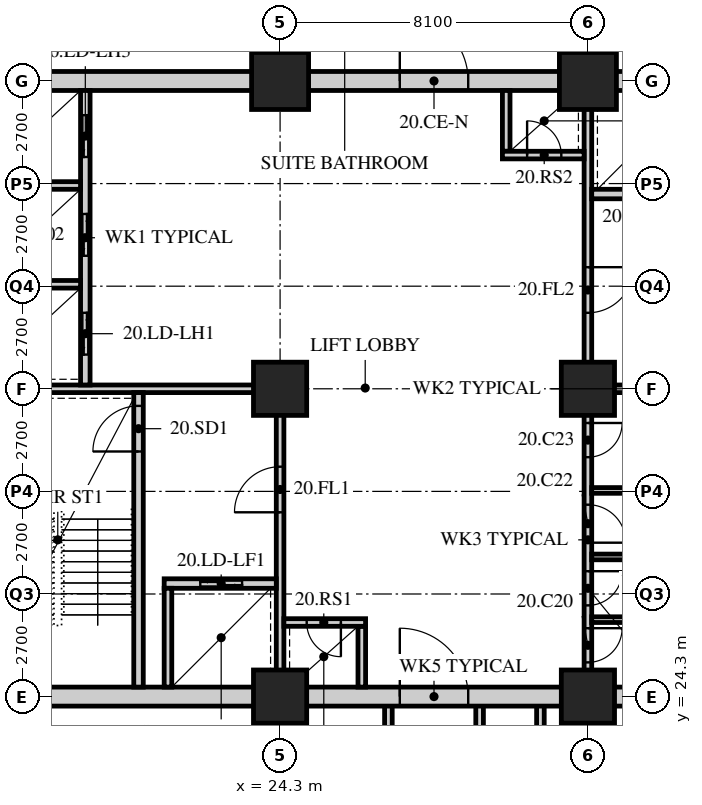
"""IFC4 building model, lengths in metres.
Left out: names, types, materials, properties, quantities, classifications, styles, units other than length and angle.
Written with IfcOpenShell. Run it as: python <this file> out.ifc"""

import sys

from ifc_helpers import new_model, si_unit, direction, frame, frame_2d, origin, origin_2d, place, context, subcontext, project, spatial, rectangle, hollow_rectangle, extrude, element, fill, save


model = new_model("IFC4")
c1 = context("Model", 3, precision=1e-05, world=origin(), true_north=direction((0.0, 1.0)))
c2 = subcontext(c1, "Body", "Model", "MODEL_VIEW")
j1 = project(units=[si_unit("LENGTHUNIT", "METRE"), si_unit("PLANEANGLEUNIT", "RADIAN")], contexts=[c1])
p1 = place(None, origin())
s1 = spatial("IfcSite", under=j1, at=p1, CompositionType="ELEMENT")
p2 = place(p1, origin())
s2 = spatial("IfcBuilding", under=s1, at=p2, CompositionType="ELEMENT")
p3 = place(p2, frame((0.0, 0.0, 80.6)))
s3 = spatial("IfcBuildingStorey", under=s2, at=p3, CompositionType="ELEMENT", Elevation=80.6)
for number, where, z_axis, x_axis in (
    (1, (24.3, 24.3, 0.0), (0.0, 0.0, 1.0), (1.0, 0.0, 0.0)),
    (2, (24.3, 32.4, 0.0), (0.0, 0.0, 1.0), (1.0, 0.0, 0.0)),
):
    element("IfcColumn", number, at=place(p3, frame(where, z_axis=z_axis, x_axis=x_axis)), inside=s3, PredefinedType="COLUMN", context=c2, shape_type="SweptSolid", body=[
        extrude(hollow_rectangle(XDim=1.4, YDim=1.4, WallThickness=0.12, at=origin_2d()), origin(), (0.0, 0.0, 1.0), 3.4),
    ])
p4 = place(p3, frame((24.3, 40.5, 0.0), z_axis=(0.0, 0.0, 1.0), x_axis=(1.0, 0.0, 0.0)))
e3 = element("IfcColumn", 3, at=p4, inside=s3, PredefinedType="COLUMN", context=c2, shape_type="SweptSolid", body=[
    extrude(hollow_rectangle(XDim=1.5, YDim=1.5, WallThickness=0.13, at=origin_2d()), origin(), (0.0, 0.0, 1.0), 3.4),
])
for number, where, z_axis, x_axis in (
    (4, (32.4, 24.3, 0.0), (0.0, 0.0, 1.0), (1.0, 0.0, 0.0)),
    (5, (32.4, 32.4, 0.0), (0.0, 0.0, 1.0), (1.0, 0.0, 0.0)),
):
    element("IfcColumn", number, at=place(p3, frame(where, z_axis=z_axis, x_axis=x_axis)), inside=s3, PredefinedType="COLUMN", context=c2, shape_type="SweptSolid", body=[
        extrude(hollow_rectangle(XDim=1.4, YDim=1.4, WallThickness=0.12, at=origin_2d()), origin(), (0.0, 0.0, 1.0), 3.4),
    ])
p5 = place(p3, frame((32.4, 40.5, 0.0), z_axis=(0.0, 0.0, 1.0), x_axis=(1.0, 0.0, 0.0)))
e6 = element("IfcColumn", 6, at=p5, inside=s3, PredefinedType="COLUMN", context=c2, shape_type="SweptSolid", body=[
    extrude(hollow_rectangle(XDim=1.5, YDim=1.5, WallThickness=0.13, at=origin_2d()), origin(), (0.0, 0.0, 1.0), 3.4),
])
for number, where, z_axis, x_axis in (
    (7, (31.15, 18.0, 0.0), (0.0, 0.0, 1.0), (0.0, 1.0, 0.0)),
    (8, (27.15, 18.0, 0.0), (0.0, 0.0, 1.0), (0.0, 1.0, 0.0)),
    (9, (29.55, 18.0, 0.0), (0.0, 0.0, 1.0), (0.0, 1.0, 0.0)),
):
    element("IfcWall", number, at=place(p3, frame(where, z_axis=z_axis, x_axis=x_axis)), inside=s3, PredefinedType="SOLIDWALL", context=c2, shape_type="SweptSolid", body=[
        extrude(rectangle(XDim=6.3, YDim=0.2, at=frame_2d((3.15, 0.0))), origin(), (0.0, 0.0, 1.0), 3.19),
    ])
p6 = place(p3, frame((15.95, 24.3, 0.0), z_axis=(0.0, 0.0, 1.0), x_axis=(1.0, 0.0, 0.0)))
e10 = element("IfcWall", 10, at=p6, inside=s3, PredefinedType="SOLIDWALL", context=c2, shape_type="SweptSolid", body=[
    extrude(rectangle(XDim=24.8, YDim=0.5, at=frame_2d((12.4, 0.0))), origin(), (0.0, 0.0, 1.0), 2.428),
])
p7 = place(p6, frame((11.5, 0.0, 0.0)))
e11 = element("IfcOpeningElement", 11, at=p7, cuts=e10, PredefinedType="OPENING", context=c2, shape_type="SweptSolid", body=[
    extrude(rectangle(XDim=1.8, YDim=2.4, at=frame_2d((0.9, 1.2))), frame((0.0, 0.26, 0.0), z_axis=(0.0, -1.0, 0.0), x_axis=(1.0, 0.0, 0.0)), (0.0, 0.0, 1.0), 0.52),
])
p8 = place(p3, frame((15.95, 40.5, 0.0), z_axis=(0.0, 0.0, 1.0), x_axis=(1.0, 0.0, 0.0)))
e12 = element("IfcWall", 12, at=p8, inside=s3, PredefinedType="SOLIDWALL", context=c2, shape_type="SweptSolid", body=[
    extrude(rectangle(XDim=24.8, YDim=0.5, at=frame_2d((12.4, 0.0))), origin(), (0.0, 0.0, 1.0), 2.428),
])
p9 = place(p8, frame((11.5, 0.0, 0.0)))
e13 = element("IfcOpeningElement", 13, at=p9, cuts=e12, PredefinedType="OPENING", context=c2, shape_type="SweptSolid", body=[
    extrude(rectangle(XDim=1.8, YDim=2.4, at=frame_2d((0.9, 1.2))), frame((0.0, 0.26, 0.0), z_axis=(0.0, -1.0, 0.0), x_axis=(1.0, 0.0, 0.0)), (0.0, 0.0, 1.0), 0.52),
])
p10 = place(p3, frame((16.45, 32.4, 0.0), z_axis=(0.0, 0.0, 1.0), x_axis=(1.0, 0.0, 0.0)))
e14 = element("IfcWall", 14, at=p10, inside=s3, PredefinedType="SOLIDWALL", context=c2, shape_type="SweptSolid", body=[
    extrude(rectangle(XDim=7.95, YDim=0.2, at=frame_2d((3.975, 0.0))), origin(), (0.0, 0.0, 1.0), 2.578),
])
p11 = place(p3, frame((24.3, 24.55, 0.0), z_axis=(0.0, 0.0, 1.0), x_axis=(0.0, 1.0, 0.0)))
e15 = element("IfcWall", 15, at=p11, inside=s3, PredefinedType="SOLIDWALL", context=c2, shape_type="SweptSolid", body=[
    extrude(rectangle(XDim=7.75, YDim=0.2, at=frame_2d((3.875, 0.0))), origin(), (0.0, 0.0, 1.0), 2.578),
])
p12 = place(p11, frame((4.6, 0.0, 0.0)))
e16 = element("IfcOpeningElement", 16, at=p12, cuts=e15, PredefinedType="OPENING", context=c2, shape_type="SweptSolid", body=[
    extrude(rectangle(XDim=1.2, YDim=2.1, at=frame_2d((0.6, 1.05))), frame((0.0, 0.11, 0.0), z_axis=(0.0, -1.0, 0.0), x_axis=(1.0, 0.0, 0.0)), (0.0, 0.0, 1.0), 0.22),
])
p13 = place(p3, frame((20.575, 24.55, 0.0), z_axis=(0.0, 0.0, 1.0), x_axis=(0.0, 1.0, 0.0)))
e17 = element("IfcWall", 17, at=p13, inside=s3, PredefinedType="SOLIDWALL", context=c2, shape_type="SweptSolid", body=[
    extrude(rectangle(XDim=7.75, YDim=0.25, at=frame_2d((3.875, 0.0))), origin(), (0.0, 0.0, 1.0), 3.19),
])
p14 = place(p13, frame((6.2, 0.0, 0.0)))
e18 = element("IfcOpeningElement", 18, at=p14, cuts=e17, PredefinedType="OPENING", context=c2, shape_type="SweptSolid", body=[
    extrude(rectangle(XDim=1.2, YDim=2.1, at=frame_2d((0.6, 1.05))), frame((0.0, 0.135, 0.0), z_axis=(0.0, -1.0, 0.0), x_axis=(1.0, 0.0, 0.0)), (0.0, 0.0, 1.0), 0.27),
])
p15 = place(p3, frame((21.25, 27.275, 0.0), z_axis=(0.0, 0.0, 1.0), x_axis=(1.0, 0.0, 0.0)))
e19 = element("IfcWall", 19, at=p15, inside=s3, PredefinedType="SOLIDWALL", context=c2, shape_type="SweptSolid", body=[
    extrude(rectangle(XDim=2.95, YDim=0.25, at=frame_2d((1.475, 0.0))), origin(), (0.0, 0.0, 1.0), 3.19),
])
p16 = place(p15, frame((0.95, 0.0, 0.0)))
e20 = element("IfcOpeningElement", 20, at=p16, cuts=e19, PredefinedType="OPENING", context=c2, shape_type="SweptSolid", body=[
    extrude(rectangle(XDim=1.1, YDim=2.4, at=frame_2d((0.55, 1.2))), frame((0.0, 0.135, 0.0), z_axis=(0.0, -1.0, 0.0), x_axis=(1.0, 0.0, 0.0)), (0.0, 0.0, 1.0), 0.27),
])
p17 = place(p3, frame((21.35, 24.55, 0.0), z_axis=(0.0, 0.0, 1.0), x_axis=(0.0, 1.0, 0.0)))
e21 = element("IfcWall", 21, at=p17, inside=s3, PredefinedType="SOLIDWALL", context=c2, shape_type="SweptSolid", body=[
    extrude(rectangle(XDim=2.6, YDim=0.2, at=frame_2d((1.3, 0.0))), origin(), (0.0, 0.0, 1.0), 3.19),
])
p18 = place(p3, frame((19.175, 32.5, 0.0), z_axis=(0.0, 0.0, 1.0), x_axis=(0.0, 1.0, 0.0)))
e22 = element("IfcWall", 22, at=p18, inside=s3, PredefinedType="SOLIDWALL", context=c2, shape_type="SweptSolid", body=[
    extrude(rectangle(XDim=7.75, YDim=0.25, at=frame_2d((3.875, 0.0))), origin(), (0.0, 0.0, 1.0), 3.19),
])
p19 = place(p18, frame((0.8, 0.0, 0.0)))
e23 = element("IfcOpeningElement", 23, at=p19, cuts=e22, PredefinedType="OPENING", context=c2, shape_type="SweptSolid", body=[
    extrude(rectangle(XDim=1.1, YDim=2.4, at=frame_2d((0.55, 1.2))), frame((0.0, 0.135, 0.0), z_axis=(0.0, -1.0, 0.0), x_axis=(1.0, 0.0, 0.0)), (0.0, 0.0, 1.0), 0.27),
])
p20 = place(p18, frame((3.4, 0.0, 0.0)))
e24 = element("IfcOpeningElement", 24, at=p20, cuts=e22, PredefinedType="OPENING", context=c2, shape_type="SweptSolid", body=[
    extrude(rectangle(XDim=1.1, YDim=2.4, at=frame_2d((0.55, 1.2))), frame((0.0, 0.135, 0.0), z_axis=(0.0, -1.0, 0.0), x_axis=(1.0, 0.0, 0.0)), (0.0, 0.0, 1.0), 0.27),
])
p21 = place(p18, frame((6.0, 0.0, 0.0)))
e25 = element("IfcOpeningElement", 25, at=p21, cuts=e22, PredefinedType="OPENING", context=c2, shape_type="SweptSolid", body=[
    extrude(rectangle(XDim=1.1, YDim=2.4, at=frame_2d((0.55, 1.2))), frame((0.0, 0.135, 0.0), z_axis=(0.0, -1.0, 0.0), x_axis=(1.0, 0.0, 0.0)), (0.0, 0.0, 1.0), 0.27),
])
for number, where, z_axis, x_axis in (
    (26, (16.45, 35.15, 0.0), (0.0, 0.0, 1.0), (1.0, 0.0, 0.0)),
    (27, (16.45, 37.75, 0.0), (0.0, 0.0, 1.0), (1.0, 0.0, 0.0)),
):
    element("IfcWall", number, at=place(p3, frame(where, z_axis=z_axis, x_axis=x_axis)), inside=s3, PredefinedType="SOLIDWALL", context=c2, shape_type="SweptSolid", body=[
        extrude(rectangle(XDim=2.6, YDim=0.2, at=frame_2d((1.3, 0.0))), origin(), (0.0, 0.0, 1.0), 3.19),
    ])
p22 = place(p3, frame((26.45, 24.55, 0.0), z_axis=(0.0, 0.0, 1.0), x_axis=(0.0, 1.0, 0.0)))
e28 = element("IfcWall", 28, at=p22, inside=s3, PredefinedType="SOLIDWALL", context=c2, shape_type="SweptSolid", body=[
    extrude(rectangle(XDim=1.6, YDim=0.2, at=frame_2d((0.8, 0.0))), origin(), (0.0, 0.0, 1.0), 3.19),
])
p23 = place(p3, frame((24.4, 26.25, 0.0), z_axis=(0.0, 0.0, 1.0), x_axis=(1.0, 0.0, 0.0)))
e29 = element("IfcWall", 29, at=p23, inside=s3, PredefinedType="SOLIDWALL", context=c2, shape_type="SweptSolid", body=[
    extrude(rectangle(XDim=2.15, YDim=0.2, at=frame_2d((1.075, 0.0))), origin(), (0.0, 0.0, 1.0), 3.19),
])
p24 = place(p23, frame((0.6, 0.0, 0.0)))
e30 = element("IfcOpeningElement", 30, at=p24, cuts=e29, PredefinedType="OPENING", context=c2, shape_type="SweptSolid", body=[
    extrude(rectangle(XDim=0.9, YDim=2.1, at=frame_2d((0.45, 1.05))), frame((0.0, 0.11, 0.0), z_axis=(0.0, -1.0, 0.0), x_axis=(1.0, 0.0, 0.0)), (0.0, 0.0, 1.0), 0.22),
])
p25 = place(p3, frame((32.3, 32.4, 0.0), z_axis=(0.0, 0.0, 1.0), x_axis=(1.0, 0.0, 0.0)))
e31 = element("IfcWall", 31, at=p25, inside=s3, PredefinedType="SOLIDWALL", context=c2, shape_type="SweptSolid", body=[
    extrude(rectangle(XDim=7.95, YDim=0.2, at=frame_2d((3.975, 0.0))), origin(), (0.0, 0.0, 1.0), 2.578),
])
p26 = place(p3, frame((32.4, 32.5, 0.0), z_axis=(0.0, 0.0, 1.0), x_axis=(0.0, 1.0, 0.0)))
e32 = element("IfcWall", 32, at=p26, inside=s3, PredefinedType="SOLIDWALL", context=c2, shape_type="SweptSolid", body=[
    extrude(rectangle(XDim=7.75, YDim=0.2, at=frame_2d((3.875, 0.0))), origin(), (0.0, 0.0, 1.0), 2.578),
])
p27 = place(p26, frame((1.9, 0.0, 0.0)))
e33 = element("IfcOpeningElement", 33, at=p27, cuts=e32, PredefinedType="OPENING", context=c2, shape_type="SweptSolid", body=[
    extrude(rectangle(XDim=1.2, YDim=2.1, at=frame_2d((0.6, 1.05))), frame((0.0, 0.11, 0.0), z_axis=(0.0, -1.0, 0.0), x_axis=(1.0, 0.0, 0.0)), (0.0, 0.0, 1.0), 0.22),
])
p28 = place(p3, frame((32.5, 37.525, 0.0), z_axis=(0.0, 0.0, 1.0), x_axis=(1.0, 0.0, 0.0)))
e34 = element("IfcWall", 34, at=p28, inside=s3, PredefinedType="SOLIDWALL", context=c2, shape_type="SweptSolid", body=[
    extrude(rectangle(XDim=2.95, YDim=0.25, at=frame_2d((1.475, 0.0))), origin(), (0.0, 0.0, 1.0), 3.19),
])
p29 = place(p28, frame((0.9, 0.0, 0.0)))
e35 = element("IfcOpeningElement", 35, at=p29, cuts=e34, PredefinedType="OPENING", context=c2, shape_type="SweptSolid", body=[
    extrude(rectangle(XDim=1.1, YDim=2.4, at=frame_2d((0.55, 1.2))), frame((0.0, 0.135, 0.0), z_axis=(0.0, -1.0, 0.0), x_axis=(1.0, 0.0, 0.0)), (0.0, 0.0, 1.0), 0.27),
])
p30 = place(p3, frame((30.25, 38.65, 0.0), z_axis=(0.0, 0.0, 1.0), x_axis=(0.0, 1.0, 0.0)))
e36 = element("IfcWall", 36, at=p30, inside=s3, PredefinedType="SOLIDWALL", context=c2, shape_type="SweptSolid", body=[
    extrude(rectangle(XDim=1.6, YDim=0.2, at=frame_2d((0.8, 0.0))), origin(), (0.0, 0.0, 1.0), 3.19),
])
p31 = place(p3, frame((30.15, 38.55, 0.0), z_axis=(0.0, 0.0, 1.0), x_axis=(1.0, 0.0, 0.0)))
e37 = element("IfcWall", 37, at=p31, inside=s3, PredefinedType="SOLIDWALL", context=c2, shape_type="SweptSolid", body=[
    extrude(rectangle(XDim=2.15, YDim=0.2, at=frame_2d((1.075, 0.0))), origin(), (0.0, 0.0, 1.0), 3.19),
])
p32 = place(p31, frame((0.65, 0.0, 0.0)))
e38 = element("IfcOpeningElement", 38, at=p32, cuts=e37, PredefinedType="OPENING", context=c2, shape_type="SweptSolid", body=[
    extrude(rectangle(XDim=0.9, YDim=2.1, at=frame_2d((0.45, 1.05))), frame((0.0, 0.11, 0.0), z_axis=(0.0, -1.0, 0.0), x_axis=(1.0, 0.0, 0.0)), (0.0, 0.0, 1.0), 0.22),
])
p33 = place(p3, frame((32.4, 24.55, 0.0), z_axis=(0.0, 0.0, 1.0), x_axis=(0.0, 1.0, 0.0)))
e39 = element("IfcWall", 39, at=p33, inside=s3, PredefinedType="PARTITIONING", context=c2, shape_type="SweptSolid", body=[
    extrude(rectangle(XDim=7.75, YDim=0.2, at=frame_2d((3.875, 0.0))), origin(), (0.0, 0.0, 1.0), 2.578),
])
p34 = place(p33, frame((0.65, 0.0, 0.0)))
e40 = element("IfcOpeningElement", 40, at=p34, cuts=e39, PredefinedType="OPENING", context=c2, shape_type="SweptSolid", body=[
    extrude(rectangle(XDim=0.9, YDim=2.1, at=frame_2d((0.45, 1.05))), frame((0.0, 0.11, 0.0), z_axis=(0.0, -1.0, 0.0), x_axis=(1.0, 0.0, 0.0)), (0.0, 0.0, 1.0), 0.22),
])
p35 = place(p33, frame((2.15, 0.0, 0.0)))
e41 = element("IfcOpeningElement", 41, at=p35, cuts=e39, PredefinedType="OPENING", context=c2, shape_type="SweptSolid", body=[
    extrude(rectangle(XDim=0.9, YDim=2.1, at=frame_2d((0.45, 1.05))), frame((0.0, 0.11, 0.0), z_axis=(0.0, -1.0, 0.0), x_axis=(1.0, 0.0, 0.0)), (0.0, 0.0, 1.0), 0.22),
])
p36 = place(p33, frame((3.8, 0.0, 0.0)))
e42 = element("IfcOpeningElement", 42, at=p36, cuts=e39, PredefinedType="OPENING", context=c2, shape_type="SweptSolid", body=[
    extrude(rectangle(XDim=1.0, YDim=2.1, at=frame_2d((0.5, 1.05))), frame((0.0, 0.11, 0.0), z_axis=(0.0, -1.0, 0.0), x_axis=(1.0, 0.0, 0.0)), (0.0, 0.0, 1.0), 0.22),
])
p37 = place(p33, frame((6.05, 0.0, 0.0)))
e43 = element("IfcOpeningElement", 43, at=p37, cuts=e39, PredefinedType="OPENING", context=c2, shape_type="SweptSolid", body=[
    extrude(rectangle(XDim=0.9, YDim=2.1, at=frame_2d((0.45, 1.05))), frame((0.0, 0.11, 0.0), z_axis=(0.0, -1.0, 0.0), x_axis=(1.0, 0.0, 0.0)), (0.0, 0.0, 1.0), 0.22),
])
for number, where, z_axis, x_axis in (
    (44, (32.5, 26.325, 0.0), (0.0, 0.0, 1.0), (1.0, 0.0, 0.0)),
    (45, (32.5, 27.975, 0.0), (0.0, 0.0, 1.0), (1.0, 0.0, 0.0)),
):
    element("IfcWall", number, at=place(p3, frame(where, z_axis=z_axis, x_axis=x_axis)), inside=s3, PredefinedType="PARTITIONING", context=c2, shape_type="SweptSolid", body=[
        extrude(rectangle(XDim=2.55, YDim=0.15, at=frame_2d((1.275, 0.0))), origin(), (0.0, 0.0, 1.0), 3.19),
    ])
p38 = place(p3, frame((32.5, 29.725, 0.0), z_axis=(0.0, 0.0, 1.0), x_axis=(1.0, 0.0, 0.0)))
e46 = element("IfcWall", 46, at=p38, inside=s3, PredefinedType="PARTITIONING", context=c2, shape_type="SweptSolid", body=[
    extrude(rectangle(XDim=2.4, YDim=0.15, at=frame_2d((1.2, 0.0))), origin(), (0.0, 0.0, 1.0), 3.19),
])
p39 = place(p34, origin())
e47 = element("IfcDoor", 47, at=p39, inside=s3, OperationType="SINGLE_SWING_LEFT", PredefinedType="DOOR", context=c2, shape_type="SweptSolid", body=[
    extrude(rectangle(XDim=0.9, YDim=2.1, at=frame_2d((0.45, 1.05))), frame((0.0, 0.025, 0.0), z_axis=(0.0, -1.0, 0.0), x_axis=(1.0, 0.0, 0.0)), (0.0, 0.0, 1.0), 0.05),
])
fill(e40, e47)
p40 = place(p35, origin())
e48 = element("IfcDoor", 48, at=p40, inside=s3, OperationType="SINGLE_SWING_LEFT", PredefinedType="DOOR", context=c2, shape_type="SweptSolid", body=[
    extrude(rectangle(XDim=0.9, YDim=2.1, at=frame_2d((0.45, 1.05))), frame((0.0, 0.025, 0.0), z_axis=(0.0, -1.0, 0.0), x_axis=(1.0, 0.0, 0.0)), (0.0, 0.0, 1.0), 0.05),
])
fill(e41, e48)
p41 = place(p36, origin())
e49 = element("IfcDoor", 49, at=p41, inside=s3, OperationType="SINGLE_SWING_RIGHT", PredefinedType="DOOR", context=c2, shape_type="SweptSolid", body=[
    extrude(rectangle(XDim=1.0, YDim=2.1, at=frame_2d((0.5, 1.05))), frame((0.0, 0.025, 0.0), z_axis=(0.0, -1.0, 0.0), x_axis=(1.0, 0.0, 0.0)), (0.0, 0.0, 1.0), 0.05),
])
fill(e42, e49)
p42 = place(p37, origin())
e50 = element("IfcDoor", 50, at=p42, inside=s3, OperationType="SINGLE_SWING_LEFT", PredefinedType="DOOR", context=c2, shape_type="SweptSolid", body=[
    extrude(rectangle(XDim=0.9, YDim=2.1, at=frame_2d((0.45, 1.05))), frame((0.0, 0.025, 0.0), z_axis=(0.0, -1.0, 0.0), x_axis=(1.0, 0.0, 0.0)), (0.0, 0.0, 1.0), 0.05),
])
fill(e43, e50)
p43 = place(p14, origin())
e51 = element("IfcDoor", 51, at=p43, inside=s3, OperationType="SINGLE_SWING_LEFT", PredefinedType="DOOR", context=c2, shape_type="SweptSolid", body=[
    extrude(rectangle(XDim=1.2, YDim=2.1, at=frame_2d((0.6, 1.05))), frame((0.0, 0.025, 0.0), z_axis=(0.0, -1.0, 0.0), x_axis=(1.0, 0.0, 0.0)), (0.0, 0.0, 1.0), 0.05),
])
fill(e18, e51)
p44 = place(p12, origin())
e52 = element("IfcDoor", 52, at=p44, inside=s3, OperationType="SINGLE_SWING_LEFT", PredefinedType="DOOR", context=c2, shape_type="SweptSolid", body=[
    extrude(rectangle(XDim=1.2, YDim=2.1, at=frame_2d((0.6, 1.05))), frame((0.0, 0.025, 0.0), z_axis=(0.0, -1.0, 0.0), x_axis=(1.0, 0.0, 0.0)), (0.0, 0.0, 1.0), 0.05),
])
fill(e16, e52)
p45 = place(p24, origin())
e53 = element("IfcDoor", 53, at=p45, inside=s3, OperationType="SINGLE_SWING_LEFT", PredefinedType="DOOR", context=c2, shape_type="SweptSolid", body=[
    extrude(rectangle(XDim=0.9, YDim=2.1, at=frame_2d((0.45, 1.05))), frame((0.0, 0.025, 0.0), z_axis=(0.0, -1.0, 0.0), x_axis=(1.0, 0.0, 0.0)), (0.0, 0.0, 1.0), 0.05),
])
fill(e30, e53)
p46 = place(p27, origin())
e54 = element("IfcDoor", 54, at=p46, inside=s3, OperationType="SINGLE_SWING_LEFT", PredefinedType="DOOR", context=c2, shape_type="SweptSolid", body=[
    extrude(rectangle(XDim=1.2, YDim=2.1, at=frame_2d((0.6, 1.05))), frame((0.0, 0.025, 0.0), z_axis=(0.0, -1.0, 0.0), x_axis=(1.0, 0.0, 0.0)), (0.0, 0.0, 1.0), 0.05),
])
fill(e33, e54)
p47 = place(p32, origin())
e55 = element("IfcDoor", 55, at=p47, inside=s3, OperationType="SINGLE_SWING_LEFT", PredefinedType="DOOR", context=c2, shape_type="SweptSolid", body=[
    extrude(rectangle(XDim=0.9, YDim=2.1, at=frame_2d((0.45, 1.05))), frame((0.0, 0.025, 0.0), z_axis=(0.0, -1.0, 0.0), x_axis=(1.0, 0.0, 0.0)), (0.0, 0.0, 1.0), 0.05),
])
fill(e38, e55)
p48 = place(p19, origin())
e56 = element("IfcDoor", 56, at=p48, inside=s3, OperationType="DOUBLE_DOOR_SLIDING", PredefinedType="DOOR", context=c2, shape_type="SweptSolid", body=[
    extrude(rectangle(XDim=1.1, YDim=2.4, at=frame_2d((0.55, 1.2))), frame((0.0, 0.025, 0.0), z_axis=(0.0, -1.0, 0.0), x_axis=(1.0, 0.0, 0.0)), (0.0, 0.0, 1.0), 0.05),
])
fill(e23, e56)
p49 = place(p20, origin())
e57 = element("IfcDoor", 57, at=p49, inside=s3, OperationType="DOUBLE_DOOR_SLIDING", PredefinedType="DOOR", context=c2, shape_type="SweptSolid", body=[
    extrude(rectangle(XDim=1.1, YDim=2.4, at=frame_2d((0.55, 1.2))), frame((0.0, 0.025, 0.0), z_axis=(0.0, -1.0, 0.0), x_axis=(1.0, 0.0, 0.0)), (0.0, 0.0, 1.0), 0.05),
])
fill(e24, e57)
p50 = place(p21, origin())
e58 = element("IfcDoor", 58, at=p50, inside=s3, OperationType="DOUBLE_DOOR_SLIDING", PredefinedType="DOOR", context=c2, shape_type="SweptSolid", body=[
    extrude(rectangle(XDim=1.1, YDim=2.4, at=frame_2d((0.55, 1.2))), frame((0.0, 0.025, 0.0), z_axis=(0.0, -1.0, 0.0), x_axis=(1.0, 0.0, 0.0)), (0.0, 0.0, 1.0), 0.05),
])
fill(e25, e58)
p51 = place(p16, origin())
e59 = element("IfcDoor", 59, at=p51, inside=s3, OperationType="DOUBLE_DOOR_SLIDING", PredefinedType="DOOR", context=c2, shape_type="SweptSolid", body=[
    extrude(rectangle(XDim=1.1, YDim=2.4, at=frame_2d((0.55, 1.2))), frame((0.0, 0.025, 0.0), z_axis=(0.0, -1.0, 0.0), x_axis=(1.0, 0.0, 0.0)), (0.0, 0.0, 1.0), 0.05),
])
fill(e20, e59)
p52 = place(p7, origin())
e60 = element("IfcDoor", 60, at=p52, inside=s3, OperationType="DOUBLE_DOOR_SINGLE_SWING", PredefinedType="DOOR", context=c2, shape_type="SweptSolid", body=[
    extrude(rectangle(XDim=1.8, YDim=2.4, at=frame_2d((0.9, 1.2))), frame((0.0, 0.025, 0.0), z_axis=(0.0, -1.0, 0.0), x_axis=(1.0, 0.0, 0.0)), (0.0, 0.0, 1.0), 0.05),
])
fill(e11, e60)
p53 = place(p9, origin())
e61 = element("IfcDoor", 61, at=p53, inside=s3, OperationType="DOUBLE_DOOR_SINGLE_SWING", PredefinedType="DOOR", context=c2, shape_type="SweptSolid", body=[
    extrude(rectangle(XDim=1.8, YDim=2.4, at=frame_2d((0.9, 1.2))), frame((0.0, 0.025, 0.0), z_axis=(0.0, -1.0, 0.0), x_axis=(1.0, 0.0, 0.0)), (0.0, 0.0, 1.0), 0.05),
])
fill(e13, e61)
save(model, sys.argv[1])
